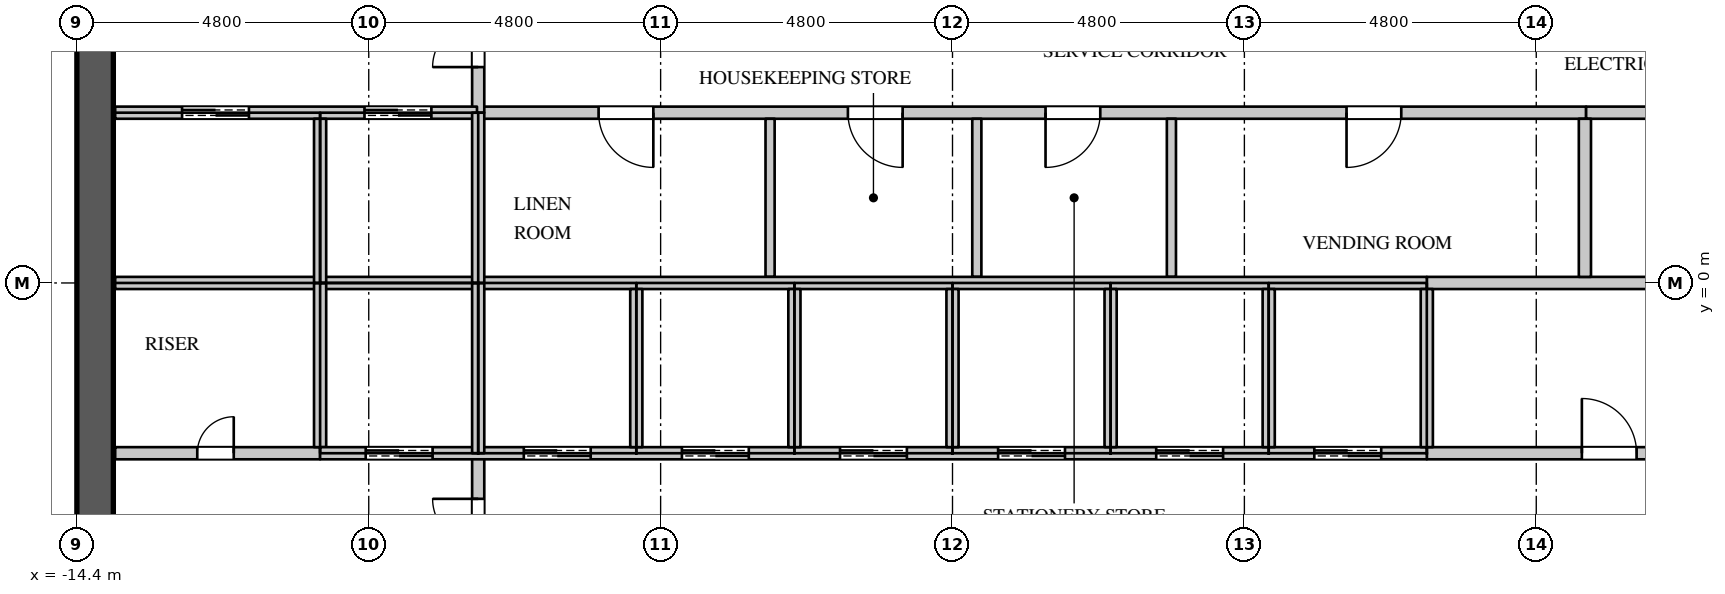
"""IFC4 building model, lengths in metres.
Left out: names, types, materials, properties, quantities, classifications, styles, units other than length and angle.
Written with IfcOpenShell. Run it as: python <this file> out.ifc"""

import sys

from ifc_helpers import new_model, si_unit, direction, frame, frame_2d, origin, place, context, subcontext, project, spatial, rectangle, extrude, element, fill, save


model = new_model("IFC4")
c1 = context("Model", 3, precision=1e-05, world=origin(), true_north=direction((0.0, 1.0)))
c2 = subcontext(c1, "Body", "Model", "MODEL_VIEW")
j1 = project(units=[si_unit("LENGTHUNIT", "METRE"), si_unit("PLANEANGLEUNIT", "RADIAN")], contexts=[c1])
p1 = place(None, origin())
s1 = spatial("IfcSite", under=j1, at=p1, CompositionType="ELEMENT")
p2 = place(p1, origin())
s2 = spatial("IfcBuilding", under=s1, at=p2, CompositionType="ELEMENT")
p3 = place(p2, frame((0.0, 0.0, 306.3)))
s3 = spatial("IfcBuildingStorey", under=s2, at=p3, CompositionType="ELEMENT", Elevation=306.3)
p4 = place(p3, frame((-14.1, -11.4, 0.0), z_axis=(0.0, 0.0, 1.0), x_axis=(0.0, 1.0, 0.0)))
e1 = element("IfcWall", 1, at=p4, inside=s3, PredefinedType="SHEAR", context=c2, shape_type="SweptSolid", body=[
    extrude(rectangle(XDim=22.8, YDim=0.6, at=frame_2d((11.4, 0.0))), origin(), (0.0, 0.0, 1.0), 4.2),
])
p5 = place(p4, frame((20.45, 0.0, 0.0)))
e2 = element("IfcOpeningElement", 2, at=p5, cuts=e1, PredefinedType="OPENING", context=c2, shape_type="SweptSolid", body=[
    extrude(rectangle(XDim=1.1, YDim=2.2, at=frame_2d((0.55, 1.1))), frame((0.0, 0.31, 0.0), z_axis=(0.0, -1.0, 0.0), x_axis=(1.0, 0.0, 0.0)), (0.0, 0.0, 1.0), 0.62),
])
p6 = place(p4, frame((1.25, 0.0, 0.0)))
e3 = element("IfcOpeningElement", 3, at=p6, cuts=e1, PredefinedType="OPENING", context=c2, shape_type="SweptSolid", body=[
    extrude(rectangle(XDim=1.1, YDim=2.2, at=frame_2d((0.55, 1.1))), frame((0.0, 0.31, 0.0), z_axis=(0.0, -1.0, 0.0), x_axis=(1.0, 0.0, 0.0)), (0.0, 0.0, 1.0), 0.62),
])
p7 = place(p4, frame((16.15, 0.0, 0.0)))
e4 = element("IfcOpeningElement", 4, at=p7, cuts=e1, PredefinedType="OPENING", context=c2, shape_type="SweptSolid", body=[
    extrude(rectangle(XDim=1.5, YDim=2.4, at=frame_2d((0.75, 1.2))), frame((0.0, 0.31, 0.0), z_axis=(0.0, -1.0, 0.0), x_axis=(1.0, 0.0, 0.0)), (0.0, 0.0, 1.0), 0.62),
])
p8 = place(p4, frame((5.15, 0.0, 0.0)))
e5 = element("IfcOpeningElement", 5, at=p8, cuts=e1, PredefinedType="OPENING", context=c2, shape_type="SweptSolid", body=[
    extrude(rectangle(XDim=1.5, YDim=2.4, at=frame_2d((0.75, 1.2))), frame((0.0, 0.31, 0.0), z_axis=(0.0, -1.0, 0.0), x_axis=(1.0, 0.0, 0.0)), (0.0, 0.0, 1.0), 0.62),
])
p9 = place(p3, frame((-7.82, 2.8, 0.0), z_axis=(0.0, 0.0, 1.0), x_axis=(1.0, 0.0, 0.0)))
e6 = element("IfcWall", 6, at=p9, inside=s3, PredefinedType="PARTITIONING", context=c2, shape_type="SweptSolid", body=[
    extrude(rectangle(XDim=18.24, YDim=0.2, at=frame_2d((9.12, 0.0))), origin(), (0.0, 0.0, 1.0), 3.9),
])
p10 = place(p9, frame((2.0, 0.0, 0.0)))
e7 = element("IfcOpeningElement", 7, at=p10, cuts=e6, PredefinedType="OPENING", context=c2, shape_type="SweptSolid", body=[
    extrude(rectangle(XDim=0.9, YDim=2.2, at=frame_2d((0.45, 1.1))), frame((0.0, 0.11, 0.0), z_axis=(0.0, -1.0, 0.0), x_axis=(1.0, 0.0, 0.0)), (0.0, 0.0, 1.0), 0.22),
])
p11 = place(p9, frame((6.1, 0.0, 0.0)))
e8 = element("IfcOpeningElement", 8, at=p11, cuts=e6, PredefinedType="OPENING", context=c2, shape_type="SweptSolid", body=[
    extrude(rectangle(XDim=0.9, YDim=2.2, at=frame_2d((0.45, 1.1))), frame((0.0, 0.11, 0.0), z_axis=(0.0, -1.0, 0.0), x_axis=(1.0, 0.0, 0.0)), (0.0, 0.0, 1.0), 0.22),
])
p12 = place(p9, frame((9.35, 0.0, 0.0)))
e9 = element("IfcOpeningElement", 9, at=p12, cuts=e6, PredefinedType="OPENING", context=c2, shape_type="SweptSolid", body=[
    extrude(rectangle(XDim=0.9, YDim=2.2, at=frame_2d((0.45, 1.1))), frame((0.0, 0.11, 0.0), z_axis=(0.0, -1.0, 0.0), x_axis=(1.0, 0.0, 0.0)), (0.0, 0.0, 1.0), 0.22),
])
p13 = place(p9, frame((14.3, 0.0, 0.0)))
e10 = element("IfcOpeningElement", 10, at=p13, cuts=e6, PredefinedType="OPENING", context=c2, shape_type="SweptSolid", body=[
    extrude(rectangle(XDim=0.9, YDim=2.2, at=frame_2d((0.45, 1.1))), frame((0.0, 0.11, 0.0), z_axis=(0.0, -1.0, 0.0), x_axis=(1.0, 0.0, 0.0)), (0.0, 0.0, 1.0), 0.22),
])
p14 = place(p3, frame((-7.8, -5.8, 0.0), z_axis=(0.0, 0.0, 1.0), x_axis=(0.0, 1.0, 0.0)))
e11 = element("IfcWall", 11, at=p14, inside=s3, PredefinedType="PARTITIONING", context=c2, shape_type="SweptSolid", body=[
    extrude(rectangle(XDim=3.0, YDim=0.2, at=frame_2d((1.5, 0.0))), origin(), (0.0, 0.0, 1.0), 3.9),
])
p15 = place(p14, frame((0.75, 0.0, 0.0)))
e12 = element("IfcOpeningElement", 12, at=p15, cuts=e11, PredefinedType="OPENING", context=c2, shape_type="SweptSolid", body=[
    extrude(rectangle(XDim=1.5, YDim=2.4, at=frame_2d((0.75, 1.2))), frame((0.0, 0.11, 0.0), z_axis=(0.0, -1.0, 0.0), x_axis=(1.0, 0.0, 0.0)), (0.0, 0.0, 1.0), 0.22),
])
p16 = place(p3, frame((-7.8, 2.8, 0.0), z_axis=(0.0, 0.0, 1.0), x_axis=(0.0, 1.0, 0.0)))
e13 = element("IfcWall", 13, at=p16, inside=s3, PredefinedType="PARTITIONING", context=c2, shape_type="SweptSolid", body=[
    extrude(rectangle(XDim=5.275, YDim=0.2, at=frame_2d((2.637, 0.0))), origin(), (0.0, 0.0, 1.0), 3.9),
])
p17 = place(p16, frame((0.75, 0.0, 0.0)))
e14 = element("IfcOpeningElement", 14, at=p17, cuts=e13, PredefinedType="OPENING", context=c2, shape_type="SweptSolid", body=[
    extrude(rectangle(XDim=1.5, YDim=2.4, at=frame_2d((0.75, 1.2))), frame((0.0, 0.11, 0.0), z_axis=(0.0, -1.0, 0.0), x_axis=(1.0, 0.0, 0.0)), (0.0, 0.0, 1.0), 0.22),
])
for number, where, z_axis, x_axis in (
    (15, (-3.0, 0.1, 0.0), (0.0, 0.0, 1.0), (0.0, 1.0, 0.0)),
    (16, (0.4, 0.1, 0.0), (0.0, 0.0, 1.0), (0.0, 1.0, 0.0)),
    (17, (3.6, 0.1, 0.0), (0.0, 0.0, 1.0), (0.0, 1.0, 0.0)),
):
    element("IfcWall", number, at=place(p3, frame(where, z_axis=z_axis, x_axis=x_axis)), inside=s3, PredefinedType="PARTITIONING", context=c2, shape_type="SweptSolid", body=[
        extrude(rectangle(XDim=2.6, YDim=0.15, at=frame_2d((1.3, 0.0))), origin(), (0.0, 0.0, 1.0), 3.9),
    ])
p18 = place(p3, frame((-13.77, -2.8, 0.0), z_axis=(0.0, 0.0, 1.0), x_axis=(1.0, 0.0, 0.0)))
e18 = element("IfcWall", 18, at=p18, inside=s3, PredefinedType="PARTITIONING", context=c2, shape_type="SweptSolid", body=[
    extrude(rectangle(XDim=3.37, YDim=0.2, at=frame_2d((1.685, 0.0))), origin(), (0.0, 0.0, 1.0), 3.9),
])
p19 = place(p18, frame((1.35, 0.0, 0.0)))
e19 = element("IfcOpeningElement", 19, at=p19, cuts=e18, PredefinedType="OPENING", context=c2, shape_type="SweptSolid", body=[
    extrude(rectangle(XDim=0.6, YDim=2.0, at=frame_2d((0.3, 1.0))), frame((0.0, 0.11, 0.0), z_axis=(0.0, -1.0, 0.0), x_axis=(1.0, 0.0, 0.0)), (0.0, 0.0, 1.0), 0.22),
])
p20 = place(p3, frame((7.8, -2.8, 0.0), z_axis=(0.0, 0.0, 1.0), x_axis=(1.0, 0.0, 0.0)))
e20 = element("IfcWall", 20, at=p20, inside=s3, PredefinedType="PARTITIONING", context=c2, shape_type="SweptSolid", body=[
    extrude(rectangle(XDim=5.97, YDim=0.2, at=frame_2d((2.985, 0.0))), origin(), (0.0, 0.0, 1.0), 3.9),
])
p21 = place(p20, frame((2.55, 0.0, 0.0)))
e21 = element("IfcOpeningElement", 21, at=p21, cuts=e20, PredefinedType="OPENING", context=c2, shape_type="SweptSolid", body=[
    extrude(rectangle(XDim=0.9, YDim=2.2, at=frame_2d((0.45, 1.1))), frame((0.0, 0.11, 0.0), z_axis=(0.0, -1.0, 0.0), x_axis=(1.0, 0.0, 0.0)), (0.0, 0.0, 1.0), 0.22),
])
p22 = place(p3, frame((7.8, 0.0, 0.0), z_axis=(0.0, 0.0, 1.0), x_axis=(1.0, 0.0, 0.0)))
e22 = element("IfcWall", 22, at=p22, inside=s3, PredefinedType="PARTITIONING", context=c2, shape_type="SweptSolid", body=[
    extrude(rectangle(XDim=5.97, YDim=0.2, at=frame_2d((2.985, 0.0))), origin(), (0.0, 0.0, 1.0), 3.9),
])
p23 = place(p3, frame((10.42, 2.8, 0.0), z_axis=(0.0, 0.0, 1.0), x_axis=(1.0, 0.0, 0.0)))
e23 = element("IfcWall", 23, at=p23, inside=s3, PredefinedType="PARTITIONING", context=c2, shape_type="SweptSolid", body=[
    extrude(rectangle(XDim=3.35, YDim=0.2, at=frame_2d((1.675, 0.0))), origin(), (0.0, 0.0, 1.0), 3.9),
])
p24 = place(p23, frame((1.35, 0.0, 0.0)))
e24 = element("IfcOpeningElement", 24, at=p24, cuts=e23, PredefinedType="OPENING", context=c2, shape_type="SweptSolid", body=[
    extrude(rectangle(XDim=0.6, YDim=2.0, at=frame_2d((0.3, 1.0))), frame((0.0, 0.11, 0.0), z_axis=(0.0, -1.0, 0.0), x_axis=(1.0, 0.0, 0.0)), (0.0, 0.0, 1.0), 0.22),
])
p25 = place(p3, frame((10.4, 0.1, 0.0), z_axis=(0.0, 0.0, 1.0), x_axis=(0.0, 1.0, 0.0)))
e25 = element("IfcWall", 25, at=p25, inside=s3, PredefinedType="PARTITIONING", context=c2, shape_type="SweptSolid", body=[
    extrude(rectangle(XDim=2.6, YDim=0.2, at=frame_2d((1.3, 0.0))), origin(), (0.0, 0.0, 1.0), 3.9),
])
p26 = place(p3, frame((-13.77, 0.0, 0.0), z_axis=(0.0, 0.0, 1.0), x_axis=(1.0, 0.0, 0.0)))
e26 = element("IfcWall", 26, at=p26, inside=s3, PredefinedType="PARTITIONING", context=c2, shape_type="SweptSolid", body=[
    extrude(rectangle(XDim=21.57, YDim=0.2, at=frame_2d((10.785, 0.0))), origin(), (0.0, 0.0, 1.0), 3.9),
])
p27 = place(p3, frame((-13.77, 2.8, 0.0), z_axis=(0.0, 0.0, 1.0), x_axis=(1.0, 0.0, 0.0)))
e27 = element("IfcWall", 27, at=p27, inside=s3, PredefinedType="PARTITIONING", context=c2, shape_type="SweptSolid", body=[
    extrude(rectangle(XDim=5.95, YDim=0.2, at=frame_2d((2.975, 0.0))), origin(), (0.0, 0.0, 1.0), 3.9),
])
p28 = place(p27, frame((1.1, 0.0, 0.0)))
e28 = element("IfcOpeningElement", 28, at=p28, cuts=e27, PredefinedType="OPENING", context=c2, shape_type="SweptSolid", body=[
    extrude(rectangle(XDim=1.1, YDim=2.2, at=frame_2d((0.55, 1.1))), frame((0.0, 0.11, 0.0), z_axis=(0.0, -1.0, 0.0), x_axis=(1.0, 0.0, 0.0)), (0.0, 0.0, 1.0), 0.22),
])
p29 = place(p27, frame((4.1, 0.0, 0.0)))
e29 = element("IfcOpeningElement", 29, at=p29, cuts=e27, PredefinedType="OPENING", context=c2, shape_type="SweptSolid", body=[
    extrude(rectangle(XDim=1.1, YDim=2.2, at=frame_2d((0.55, 1.1))), frame((0.0, 0.11, 0.0), z_axis=(0.0, -1.0, 0.0), x_axis=(1.0, 0.0, 0.0)), (0.0, 0.0, 1.0), 0.22),
])
p30 = place(p3, frame((-10.4, -2.7, 0.0), z_axis=(0.0, 0.0, 1.0), x_axis=(0.0, 1.0, 0.0)))
e30 = element("IfcWall", 30, at=p30, inside=s3, PredefinedType="PARTITIONING", context=c2, shape_type="SweptSolid", body=[
    extrude(rectangle(XDim=2.7, YDim=0.2, at=frame_2d((1.35, 0.0))), origin(), (0.0, 0.0, 1.0), 3.9),
])
p31 = place(p3, frame((-10.4, -2.8, 0.0), z_axis=(0.0, 0.0, 1.0), x_axis=(1.0, 0.0, 0.0)))
e31 = element("IfcWall", 31, at=p31, inside=s3, PredefinedType="PARTITIONING", context=c2, shape_type="SweptSolid", body=[
    extrude(rectangle(XDim=18.2, YDim=0.2, at=frame_2d((9.1, 0.0))), origin(), (0.0, 0.0, 1.0), 3.9),
])
p32 = place(p31, frame((0.75, 0.0, 0.0)))
e32 = element("IfcOpeningElement", 32, at=p32, cuts=e31, PredefinedType="OPENING", context=c2, shape_type="SweptSolid", body=[
    extrude(rectangle(XDim=1.1, YDim=2.2, at=frame_2d((0.55, 1.1))), frame((0.0, 0.11, 0.0), z_axis=(0.0, -1.0, 0.0), x_axis=(1.0, 0.0, 0.0)), (0.0, 0.0, 1.0), 0.22),
])
p33 = place(p31, frame((3.35, 0.0, 0.0)))
e33 = element("IfcOpeningElement", 33, at=p33, cuts=e31, PredefinedType="OPENING", context=c2, shape_type="SweptSolid", body=[
    extrude(rectangle(XDim=1.1, YDim=2.2, at=frame_2d((0.55, 1.1))), frame((0.0, 0.11, 0.0), z_axis=(0.0, -1.0, 0.0), x_axis=(1.0, 0.0, 0.0)), (0.0, 0.0, 1.0), 0.22),
])
p34 = place(p31, frame((5.95, 0.0, 0.0)))
e34 = element("IfcOpeningElement", 34, at=p34, cuts=e31, PredefinedType="OPENING", context=c2, shape_type="SweptSolid", body=[
    extrude(rectangle(XDim=1.1, YDim=2.2, at=frame_2d((0.55, 1.1))), frame((0.0, 0.11, 0.0), z_axis=(0.0, -1.0, 0.0), x_axis=(1.0, 0.0, 0.0)), (0.0, 0.0, 1.0), 0.22),
])
p35 = place(p31, frame((8.55, 0.0, 0.0)))
e35 = element("IfcOpeningElement", 35, at=p35, cuts=e31, PredefinedType="OPENING", context=c2, shape_type="SweptSolid", body=[
    extrude(rectangle(XDim=1.1, YDim=2.2, at=frame_2d((0.55, 1.1))), frame((0.0, 0.11, 0.0), z_axis=(0.0, -1.0, 0.0), x_axis=(1.0, 0.0, 0.0)), (0.0, 0.0, 1.0), 0.22),
])
p36 = place(p31, frame((11.15, 0.0, 0.0)))
e36 = element("IfcOpeningElement", 36, at=p36, cuts=e31, PredefinedType="OPENING", context=c2, shape_type="SweptSolid", body=[
    extrude(rectangle(XDim=1.1, YDim=2.2, at=frame_2d((0.55, 1.1))), frame((0.0, 0.11, 0.0), z_axis=(0.0, -1.0, 0.0), x_axis=(1.0, 0.0, 0.0)), (0.0, 0.0, 1.0), 0.22),
])
p37 = place(p31, frame((13.75, 0.0, 0.0)))
e37 = element("IfcOpeningElement", 37, at=p37, cuts=e31, PredefinedType="OPENING", context=c2, shape_type="SweptSolid", body=[
    extrude(rectangle(XDim=1.1, YDim=2.2, at=frame_2d((0.55, 1.1))), frame((0.0, 0.11, 0.0), z_axis=(0.0, -1.0, 0.0), x_axis=(1.0, 0.0, 0.0)), (0.0, 0.0, 1.0), 0.22),
])
p38 = place(p31, frame((16.35, 0.0, 0.0)))
e38 = element("IfcOpeningElement", 38, at=p38, cuts=e31, PredefinedType="OPENING", context=c2, shape_type="SweptSolid", body=[
    extrude(rectangle(XDim=1.1, YDim=2.2, at=frame_2d((0.55, 1.1))), frame((0.0, 0.11, 0.0), z_axis=(0.0, -1.0, 0.0), x_axis=(1.0, 0.0, 0.0)), (0.0, 0.0, 1.0), 0.22),
])
p39 = place(p3, frame((-10.4, 0.0, 0.0), z_axis=(0.0, 0.0, 1.0), x_axis=(0.0, 1.0, 0.0)))
e39 = element("IfcWall", 39, at=p39, inside=s3, PredefinedType="PARTITIONING", context=c2, shape_type="SweptSolid", body=[
    extrude(rectangle(XDim=2.7, YDim=0.2, at=frame_2d((1.35, 0.0))), origin(), (0.0, 0.0, 1.0), 3.9),
])
for number, where, z_axis, x_axis in (
    (40, (-7.8, -2.8, 0.0), (0.0, 0.0, 1.0), (0.0, 1.0, 0.0)),
    (41, (-7.8, 0.0, 0.0), (0.0, 0.0, 1.0), (0.0, 1.0, 0.0)),
):
    element("IfcWall", number, at=place(p3, frame(where, z_axis=z_axis, x_axis=x_axis)), inside=s3, PredefinedType="PARTITIONING", context=c2, shape_type="SweptSolid", body=[
        extrude(rectangle(XDim=2.8, YDim=0.2, at=frame_2d((1.4, 0.0))), origin(), (0.0, 0.0, 1.0), 3.9),
    ])
for number, where, z_axis, x_axis in (
    (42, (-5.2, -2.7, 0.0), (0.0, 0.0, 1.0), (0.0, 1.0, 0.0)),
    (43, (-2.6, -2.7, 0.0), (0.0, 0.0, 1.0), (0.0, 1.0, 0.0)),
    (44, (0.0, -2.7, 0.0), (0.0, 0.0, 1.0), (0.0, 1.0, 0.0)),
    (45, (2.6, -2.7, 0.0), (0.0, 0.0, 1.0), (0.0, 1.0, 0.0)),
    (46, (5.2, -2.7, 0.0), (0.0, 0.0, 1.0), (0.0, 1.0, 0.0)),
    (47, (7.8, -2.7, 0.0), (0.0, 0.0, 1.0), (0.0, 1.0, 0.0)),
):
    element("IfcWall", number, at=place(p3, frame(where, z_axis=z_axis, x_axis=x_axis)), inside=s3, PredefinedType="PARTITIONING", context=c2, shape_type="SweptSolid", body=[
        extrude(rectangle(XDim=2.6, YDim=0.2, at=frame_2d((1.3, 0.0))), origin(), (0.0, 0.0, 1.0), 3.9),
    ])
p40 = place(p19, origin())
e48 = element("IfcDoor", 48, at=p40, inside=s3, OperationType="SINGLE_SWING_RIGHT", PredefinedType="DOOR", context=c2, shape_type="SweptSolid", body=[
    extrude(rectangle(XDim=0.6, YDim=2.0, at=frame_2d((0.3, 1.0))), frame((0.0, 0.025, 0.0), z_axis=(0.0, -1.0, 0.0), x_axis=(1.0, 0.0, 0.0)), (0.0, 0.0, 1.0), 0.05),
])
fill(e19, e48)
p41 = place(p21, origin())
e49 = element("IfcDoor", 49, at=p41, inside=s3, OperationType="SINGLE_SWING_LEFT", PredefinedType="DOOR", context=c2, shape_type="SweptSolid", body=[
    extrude(rectangle(XDim=0.9, YDim=2.2, at=frame_2d((0.45, 1.1))), frame((0.0, 0.025, 0.0), z_axis=(0.0, -1.0, 0.0), x_axis=(1.0, 0.0, 0.0)), (0.0, 0.0, 1.0), 0.05),
])
fill(e21, e49)
p42 = place(p10, origin())
e50 = element("IfcDoor", 50, at=p42, inside=s3, OperationType="SINGLE_SWING_LEFT", PredefinedType="DOOR", context=c2, shape_type="SweptSolid", body=[
    extrude(rectangle(XDim=0.9, YDim=2.2, at=frame_2d((0.45, 1.1))), frame((0.0, 0.025, 0.0), z_axis=(0.0, -1.0, 0.0), x_axis=(1.0, 0.0, 0.0)), (0.0, 0.0, 1.0), 0.05),
])
fill(e7, e50)
p43 = place(p11, origin())
e51 = element("IfcDoor", 51, at=p43, inside=s3, OperationType="SINGLE_SWING_LEFT", PredefinedType="DOOR", context=c2, shape_type="SweptSolid", body=[
    extrude(rectangle(XDim=0.9, YDim=2.2, at=frame_2d((0.45, 1.1))), frame((0.0, 0.025, 0.0), z_axis=(0.0, -1.0, 0.0), x_axis=(1.0, 0.0, 0.0)), (0.0, 0.0, 1.0), 0.05),
])
fill(e8, e51)
p44 = place(p12, origin())
e52 = element("IfcDoor", 52, at=p44, inside=s3, OperationType="SINGLE_SWING_RIGHT", PredefinedType="DOOR", context=c2, shape_type="SweptSolid", body=[
    extrude(rectangle(XDim=0.9, YDim=2.2, at=frame_2d((0.45, 1.1))), frame((0.0, 0.025, 0.0), z_axis=(0.0, -1.0, 0.0), x_axis=(1.0, 0.0, 0.0)), (0.0, 0.0, 1.0), 0.05),
])
fill(e9, e52)
p45 = place(p13, origin())
e53 = element("IfcDoor", 53, at=p45, inside=s3, OperationType="SINGLE_SWING_RIGHT", PredefinedType="DOOR", context=c2, shape_type="SweptSolid", body=[
    extrude(rectangle(XDim=0.9, YDim=2.2, at=frame_2d((0.45, 1.1))), frame((0.0, 0.025, 0.0), z_axis=(0.0, -1.0, 0.0), x_axis=(1.0, 0.0, 0.0)), (0.0, 0.0, 1.0), 0.05),
])
fill(e10, e53)
p46 = place(p28, origin())
e54 = element("IfcDoor", 54, at=p46, inside=s3, OperationType="DOUBLE_DOOR_SLIDING", PredefinedType="DOOR", context=c2, shape_type="SweptSolid", body=[
    extrude(rectangle(XDim=1.1, YDim=2.2, at=frame_2d((0.55, 1.1))), frame((0.0, 0.025, 0.0), z_axis=(0.0, -1.0, 0.0), x_axis=(1.0, 0.0, 0.0)), (0.0, 0.0, 1.0), 0.05),
])
fill(e28, e54)
p47 = place(p29, origin())
e55 = element("IfcDoor", 55, at=p47, inside=s3, OperationType="DOUBLE_DOOR_SLIDING", PredefinedType="DOOR", context=c2, shape_type="SweptSolid", body=[
    extrude(rectangle(XDim=1.1, YDim=2.2, at=frame_2d((0.55, 1.1))), frame((0.0, 0.025, 0.0), z_axis=(0.0, -1.0, 0.0), x_axis=(1.0, 0.0, 0.0)), (0.0, 0.0, 1.0), 0.05),
])
fill(e29, e55)
p48 = place(p32, origin())
e56 = element("IfcDoor", 56, at=p48, inside=s3, OperationType="DOUBLE_DOOR_SLIDING", PredefinedType="DOOR", context=c2, shape_type="SweptSolid", body=[
    extrude(rectangle(XDim=1.1, YDim=2.2, at=frame_2d((0.55, 1.1))), frame((0.0, 0.025, 0.0), z_axis=(0.0, -1.0, 0.0), x_axis=(1.0, 0.0, 0.0)), (0.0, 0.0, 1.0), 0.05),
])
fill(e32, e56)
p49 = place(p33, origin())
e57 = element("IfcDoor", 57, at=p49, inside=s3, OperationType="DOUBLE_DOOR_SLIDING", PredefinedType="DOOR", context=c2, shape_type="SweptSolid", body=[
    extrude(rectangle(XDim=1.1, YDim=2.2, at=frame_2d((0.55, 1.1))), frame((0.0, 0.025, 0.0), z_axis=(0.0, -1.0, 0.0), x_axis=(1.0, 0.0, 0.0)), (0.0, 0.0, 1.0), 0.05),
])
fill(e33, e57)
p50 = place(p34, origin())
e58 = element("IfcDoor", 58, at=p50, inside=s3, OperationType="DOUBLE_DOOR_SLIDING", PredefinedType="DOOR", context=c2, shape_type="SweptSolid", body=[
    extrude(rectangle(XDim=1.1, YDim=2.2, at=frame_2d((0.55, 1.1))), frame((0.0, 0.025, 0.0), z_axis=(0.0, -1.0, 0.0), x_axis=(1.0, 0.0, 0.0)), (0.0, 0.0, 1.0), 0.05),
])
fill(e34, e58)
p51 = place(p35, origin())
e59 = element("IfcDoor", 59, at=p51, inside=s3, OperationType="DOUBLE_DOOR_SLIDING", PredefinedType="DOOR", context=c2, shape_type="SweptSolid", body=[
    extrude(rectangle(XDim=1.1, YDim=2.2, at=frame_2d((0.55, 1.1))), frame((0.0, 0.025, 0.0), z_axis=(0.0, -1.0, 0.0), x_axis=(1.0, 0.0, 0.0)), (0.0, 0.0, 1.0), 0.05),
])
fill(e35, e59)
p52 = place(p36, origin())
e60 = element("IfcDoor", 60, at=p52, inside=s3, OperationType="DOUBLE_DOOR_SLIDING", PredefinedType="DOOR", context=c2, shape_type="SweptSolid", body=[
    extrude(rectangle(XDim=1.1, YDim=2.2, at=frame_2d((0.55, 1.1))), frame((0.0, 0.025, 0.0), z_axis=(0.0, -1.0, 0.0), x_axis=(1.0, 0.0, 0.0)), (0.0, 0.0, 1.0), 0.05),
])
fill(e36, e60)
p53 = place(p37, origin())
e61 = element("IfcDoor", 61, at=p53, inside=s3, OperationType="DOUBLE_DOOR_SLIDING", PredefinedType="DOOR", context=c2, shape_type="SweptSolid", body=[
    extrude(rectangle(XDim=1.1, YDim=2.2, at=frame_2d((0.55, 1.1))), frame((0.0, 0.025, 0.0), z_axis=(0.0, -1.0, 0.0), x_axis=(1.0, 0.0, 0.0)), (0.0, 0.0, 1.0), 0.05),
])
fill(e37, e61)
p54 = place(p38, origin())
e62 = element("IfcDoor", 62, at=p54, inside=s3, OperationType="DOUBLE_DOOR_SLIDING", PredefinedType="DOOR", context=c2, shape_type="SweptSolid", body=[
    extrude(rectangle(XDim=1.1, YDim=2.2, at=frame_2d((0.55, 1.1))), frame((0.0, 0.025, 0.0), z_axis=(0.0, -1.0, 0.0), x_axis=(1.0, 0.0, 0.0)), (0.0, 0.0, 1.0), 0.05),
])
fill(e38, e62)
p55 = place(p17, origin())
e63 = element("IfcDoor", 63, at=p55, inside=s3, OperationType="DOUBLE_DOOR_SINGLE_SWING", PredefinedType="DOOR", context=c2, shape_type="SweptSolid", body=[
    extrude(rectangle(XDim=1.5, YDim=2.4, at=frame_2d((0.75, 1.2))), frame((0.0, 0.025, 0.0), z_axis=(0.0, -1.0, 0.0), x_axis=(1.0, 0.0, 0.0)), (0.0, 0.0, 1.0), 0.05),
])
fill(e14, e63)
p56 = place(p15, origin())
e64 = element("IfcDoor", 64, at=p56, inside=s3, OperationType="DOUBLE_DOOR_SINGLE_SWING", PredefinedType="DOOR", context=c2, shape_type="SweptSolid", body=[
    extrude(rectangle(XDim=1.5, YDim=2.4, at=frame_2d((0.75, 1.2))), frame((0.0, 0.025, 0.0), z_axis=(0.0, -1.0, 0.0), x_axis=(1.0, 0.0, 0.0)), (0.0, 0.0, 1.0), 0.05),
])
fill(e12, e64)
save(model, sys.argv[1])
